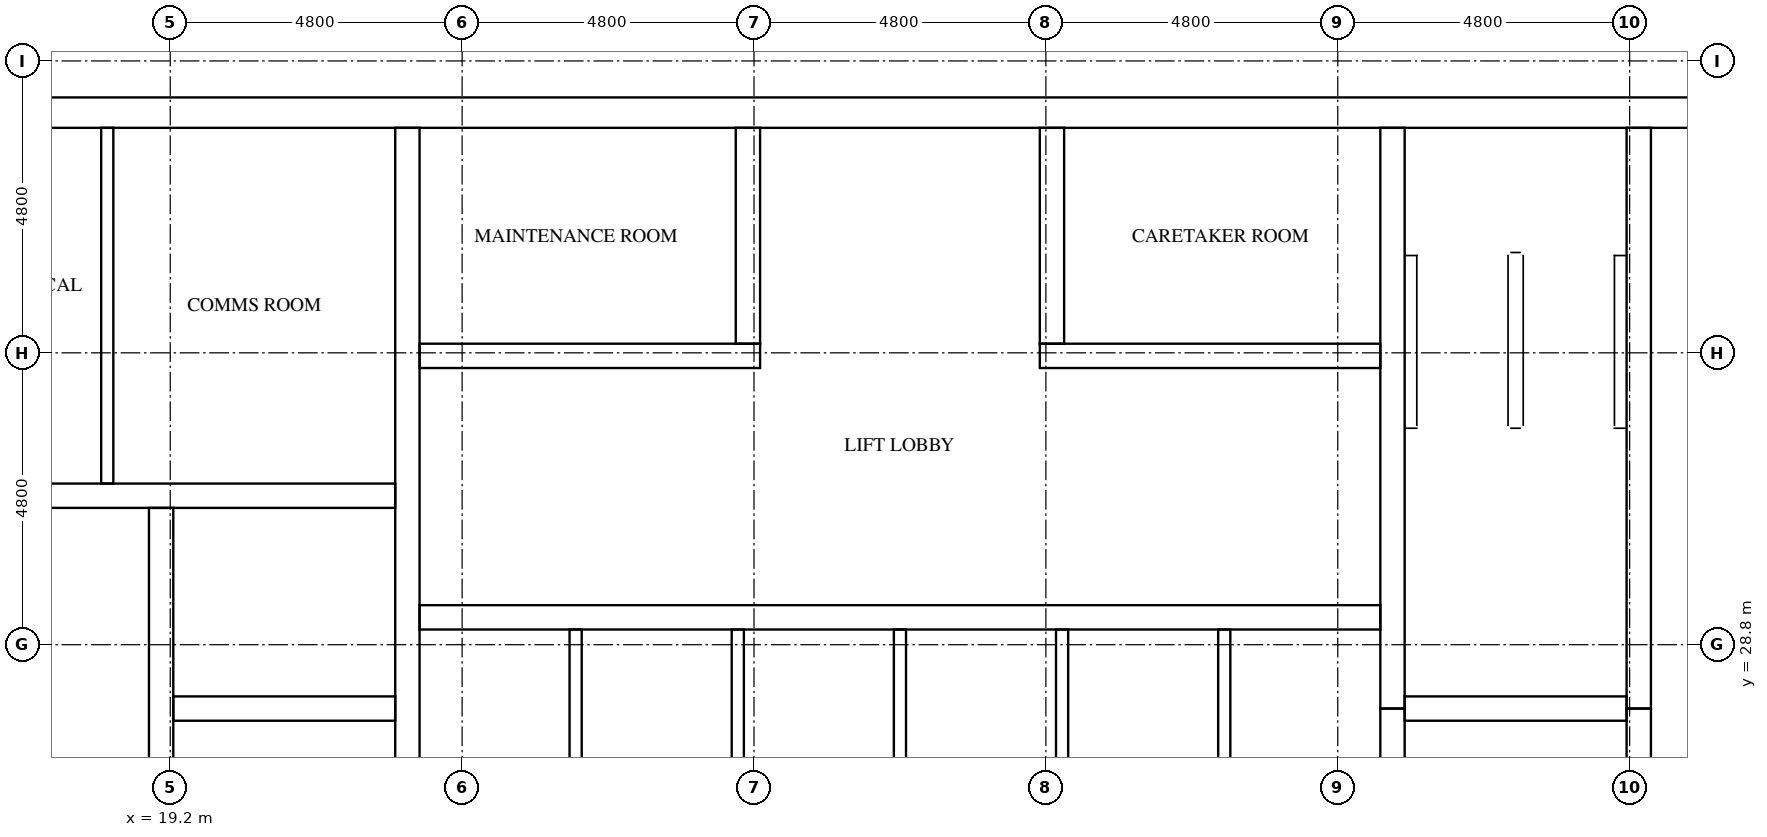
"""IFC4 building model, lengths in metres.
Left out: names, types, materials, properties, quantities, classifications, styles, units other than length and angle.
Written with IfcOpenShell. Run it as: python <this file> out.ifc"""

import sys

from ifc_helpers import new_model, si_unit, direction, frame, frame_2d, origin, place, context, subcontext, project, spatial, rectangle, extrude, element, fill, save


model = new_model("IFC4")
c1 = context("Model", 3, precision=1e-05, world=origin(), true_north=direction((0.0, 1.0)))
c2 = subcontext(c1, "Body", "Model", "MODEL_VIEW")
j1 = project(units=[si_unit("LENGTHUNIT", "METRE"), si_unit("PLANEANGLEUNIT", "RADIAN")], contexts=[c1])
p1 = place(None, origin())
s1 = spatial("IfcSite", under=j1, at=p1, CompositionType="ELEMENT")
p2 = place(p1, origin())
s2 = spatial("IfcBuilding", under=s1, at=p2, CompositionType="ELEMENT")
p3 = place(p2, frame((0.0, 0.0, 275.6)))
s3 = spatial("IfcBuildingStorey", under=s2, at=p3, CompositionType="ELEMENT", Elevation=275.6)
p4 = place(p3, frame((15.0, 37.55, 0.0), z_axis=(0.0, 0.0, 1.0), x_axis=(1.0, 0.0, 0.0)))
e1 = element("IfcWall", 1, at=p4, inside=s3, PredefinedType="SHEAR", context=c2, shape_type="SweptSolid", body=[
    extrude(rectangle(XDim=32.4, YDim=0.5, at=frame_2d((16.2, 0.0))), origin(), (0.0, 0.0, 1.0), 3.2),
])
p5 = place(p4, frame((15.3, 0.0, 0.0)))
e2 = element("IfcOpeningElement", 2, at=p5, cuts=e1, PredefinedType="OPENING", context=c2, shape_type="SweptSolid", body=[
    extrude(rectangle(XDim=1.8, YDim=2.1, at=frame_2d((0.9, 1.05))), frame((0.0, 0.26, 0.0), z_axis=(0.0, -1.0, 0.0), x_axis=(1.0, 0.0, 0.0)), (0.0, 0.0, 1.0), 0.52),
])
p6 = place(p4, frame((1.282, 0.0, 0.0)))
e3 = element("IfcOpeningElement", 3, at=p6, cuts=e1, PredefinedType="OPENING", context=c2, shape_type="SweptSolid", body=[
    extrude(rectangle(XDim=1.0, YDim=2.1, at=frame_2d((0.5, 1.05))), frame((0.0, 0.26, 0.0), z_axis=(0.0, -1.0, 0.0), x_axis=(1.0, 0.0, 0.0)), (0.0, 0.0, 1.0), 0.52),
])
p7 = place(p4, frame((5.082, 0.0, 0.0)))
e4 = element("IfcOpeningElement", 4, at=p7, cuts=e1, PredefinedType="OPENING", context=c2, shape_type="SweptSolid", body=[
    extrude(rectangle(XDim=1.0, YDim=2.1, at=frame_2d((0.5, 1.05))), frame((0.0, 0.26, 0.0), z_axis=(0.0, -1.0, 0.0), x_axis=(1.0, 0.0, 0.0)), (0.0, 0.0, 1.0), 0.52),
])
p8 = place(p3, frame((19.05, 15.5, 0.0), z_axis=(0.0, 0.0, 1.0), x_axis=(0.0, 1.0, 0.0)))
e5 = element("IfcWall", 5, at=p8, inside=s3, PredefinedType="SHEAR", context=c2, shape_type="SweptSolid", body=[
    extrude(rectangle(XDim=15.55, YDim=0.4, at=frame_2d((7.775, 0.0))), origin(), (0.0, 0.0, 1.0), 3.2),
])
p9 = place(p8, frame((9.95, 0.0, 0.0)))
e6 = element("IfcOpeningElement", 6, at=p9, cuts=e5, PredefinedType="OPENING", context=c2, shape_type="SweptSolid", body=[
    extrude(rectangle(XDim=1.1, YDim=2.1, at=frame_2d((0.55, 1.05))), frame((0.0, 0.21, 0.0), z_axis=(0.0, -1.0, 0.0), x_axis=(1.0, 0.0, 0.0)), (0.0, 0.0, 1.0), 0.42),
])
p10 = place(p8, frame((13.45, 0.0, 0.0)))
e7 = element("IfcOpeningElement", 7, at=p10, cuts=e5, PredefinedType="OPENING", context=c2, shape_type="SweptSolid", body=[
    extrude(rectangle(XDim=1.1, YDim=2.1, at=frame_2d((0.55, 1.05))), frame((0.0, 0.21, 0.0), z_axis=(0.0, -1.0, 0.0), x_axis=(1.0, 0.0, 0.0)), (0.0, 0.0, 1.0), 0.42),
])
p11 = place(p8, frame((0.7, 0.0, 0.0)))
e8 = element("IfcOpeningElement", 8, at=p11, cuts=e5, PredefinedType="OPENING", context=c2, shape_type="SweptSolid", body=[
    extrude(rectangle(XDim=1.2, YDim=2.1, at=frame_2d((0.6, 1.05))), frame((0.0, 0.21, 0.0), z_axis=(0.0, -1.0, 0.0), x_axis=(1.0, 0.0, 0.0)), (0.0, 0.0, 1.0), 0.42),
])
p12 = place(p3, frame((23.1, 15.5, 0.0), z_axis=(0.0, 0.0, 1.0), x_axis=(0.0, 1.0, 0.0)))
e9 = element("IfcWall", 9, at=p12, inside=s3, PredefinedType="SHEAR", context=c2, shape_type="SweptSolid", body=[
    extrude(rectangle(XDim=21.8, YDim=0.4, at=frame_2d((10.9, 0.0))), origin(), (0.0, 0.0, 1.0), 3.2),
])
p13 = place(p3, frame((39.3, 24.25, 0.0), z_axis=(0.0, 0.0, 1.0), x_axis=(0.0, 1.0, 0.0)))
e10 = element("IfcWall", 10, at=p13, inside=s3, PredefinedType="SHEAR", context=c2, shape_type="SweptSolid", body=[
    extrude(rectangle(XDim=3.5, YDim=0.4, at=frame_2d((1.75, 0.0))), origin(), (0.0, 0.0, 1.0), 3.2),
])
p14 = place(p3, frame((39.3, 27.75, 0.0), z_axis=(0.0, 0.0, 1.0), x_axis=(0.0, 1.0, 0.0)))
e11 = element("IfcWall", 11, at=p14, inside=s3, PredefinedType="SHEAR", context=c2, shape_type="SweptSolid", body=[
    extrude(rectangle(XDim=9.55, YDim=0.4, at=frame_2d((4.775, 0.0))), origin(), (0.0, 0.0, 1.0), 3.2),
])
p15 = place(p3, frame((43.35, 24.25, 0.0), z_axis=(0.0, 0.0, 1.0), x_axis=(0.0, 1.0, 0.0)))
e12 = element("IfcWall", 12, at=p15, inside=s3, PredefinedType="SHEAR", context=c2, shape_type="SweptSolid", body=[
    extrude(rectangle(XDim=3.5, YDim=0.4, at=frame_2d((1.75, 0.0))), origin(), (0.0, 0.0, 1.0), 3.2),
])
p16 = place(p15, frame((1.2, 0.0, 0.0)))
e13 = element("IfcOpeningElement", 13, at=p16, cuts=e12, PredefinedType="OPENING", context=c2, shape_type="SweptSolid", body=[
    extrude(rectangle(XDim=1.1, YDim=2.1, at=frame_2d((0.55, 1.05))), frame((0.0, 0.21, 0.0), z_axis=(0.0, -1.0, 0.0), x_axis=(1.0, 0.0, 0.0)), (0.0, 0.0, 1.0), 0.42),
])
p17 = place(p3, frame((43.35, 27.75, 0.0), z_axis=(0.0, 0.0, 1.0), x_axis=(0.0, 1.0, 0.0)))
e14 = element("IfcWall", 14, at=p17, inside=s3, PredefinedType="SHEAR", context=c2, shape_type="SweptSolid", body=[
    extrude(rectangle(XDim=9.55, YDim=0.4, at=frame_2d((4.775, 0.0))), origin(), (0.0, 0.0, 1.0), 3.2),
])
p18 = place(p17, frame((7.65, 0.0, 0.0)))
e15 = element("IfcOpeningElement", 15, at=p18, cuts=e14, PredefinedType="OPENING", context=c2, shape_type="SweptSolid", body=[
    extrude(rectangle(XDim=1.2, YDim=2.1, at=frame_2d((0.6, 1.05))), frame((0.0, 0.21, 0.0), z_axis=(0.0, -1.0, 0.0), x_axis=(1.0, 0.0, 0.0)), (0.0, 0.0, 1.0), 0.42),
])
p19 = place(p3, frame((19.25, 27.75, 0.0), z_axis=(0.0, 0.0, 1.0), x_axis=(1.0, 0.0, 0.0)))
e16 = element("IfcWall", 16, at=p19, inside=s3, PredefinedType="SHEAR", context=c2, shape_type="SweptSolid", body=[
    extrude(rectangle(XDim=3.65, YDim=0.4, at=frame_2d((1.825, 0.0))), origin(), (0.0, 0.0, 1.0), 3.2),
])
p20 = place(p3, frame((15.5, 31.25, 0.0), z_axis=(0.0, 0.0, 1.0), x_axis=(1.0, 0.0, 0.0)))
e17 = element("IfcWall", 17, at=p20, inside=s3, PredefinedType="SHEAR", context=c2, shape_type="SweptSolid", body=[
    extrude(rectangle(XDim=7.4, YDim=0.4, at=frame_2d((3.7, 0.0))), origin(), (0.0, 0.0, 1.0), 3.2),
])
p21 = place(p3, frame((39.5, 27.75, 0.0), z_axis=(0.0, 0.0, 1.0), x_axis=(1.0, 0.0, 0.0)))
e18 = element("IfcWall", 18, at=p21, inside=s3, PredefinedType="SHEAR", context=c2, shape_type="SweptSolid", body=[
    extrude(rectangle(XDim=3.65, YDim=0.4, at=frame_2d((1.825, 0.0))), origin(), (0.0, 0.0, 1.0), 3.2),
])
p22 = place(p3, frame((23.3, 29.25, 0.0), z_axis=(0.0, 0.0, 1.0), x_axis=(1.0, 0.0, 0.0)))
e19 = element("IfcWall", 19, at=p22, inside=s3, PredefinedType="SHEAR", context=c2, shape_type="SweptSolid", body=[
    extrude(rectangle(XDim=15.8, YDim=0.4, at=frame_2d((7.9, 0.0))), origin(), (0.0, 0.0, 1.0), 3.2),
])
p23 = place(p22, frame((0.683, 0.0, 0.0)))
e20 = element("IfcOpeningElement", 20, at=p23, cuts=e19, PredefinedType="OPENING", context=c2, shape_type="SweptSolid", body=[
    extrude(rectangle(XDim=1.1, YDim=2.1, at=frame_2d((0.55, 1.05))), frame((0.0, 0.21, 0.0), z_axis=(0.0, -1.0, 0.0), x_axis=(1.0, 0.0, 0.0)), (0.0, 0.0, 1.0), 0.42),
])
p24 = place(p22, frame((3.35, 0.0, 0.0)))
e21 = element("IfcOpeningElement", 21, at=p24, cuts=e19, PredefinedType="OPENING", context=c2, shape_type="SweptSolid", body=[
    extrude(rectangle(XDim=1.1, YDim=2.1, at=frame_2d((0.55, 1.05))), frame((0.0, 0.21, 0.0), z_axis=(0.0, -1.0, 0.0), x_axis=(1.0, 0.0, 0.0)), (0.0, 0.0, 1.0), 0.42),
])
p25 = place(p22, frame((6.017, 0.0, 0.0)))
e22 = element("IfcOpeningElement", 22, at=p25, cuts=e19, PredefinedType="OPENING", context=c2, shape_type="SweptSolid", body=[
    extrude(rectangle(XDim=1.1, YDim=2.1, at=frame_2d((0.55, 1.05))), frame((0.0, 0.21, 0.0), z_axis=(0.0, -1.0, 0.0), x_axis=(1.0, 0.0, 0.0)), (0.0, 0.0, 1.0), 0.42),
])
p26 = place(p22, frame((8.683, 0.0, 0.0)))
e23 = element("IfcOpeningElement", 23, at=p26, cuts=e19, PredefinedType="OPENING", context=c2, shape_type="SweptSolid", body=[
    extrude(rectangle(XDim=1.1, YDim=2.1, at=frame_2d((0.55, 1.05))), frame((0.0, 0.21, 0.0), z_axis=(0.0, -1.0, 0.0), x_axis=(1.0, 0.0, 0.0)), (0.0, 0.0, 1.0), 0.42),
])
p27 = place(p22, frame((11.35, 0.0, 0.0)))
e24 = element("IfcOpeningElement", 24, at=p27, cuts=e19, PredefinedType="OPENING", context=c2, shape_type="SweptSolid", body=[
    extrude(rectangle(XDim=1.1, YDim=2.1, at=frame_2d((0.55, 1.05))), frame((0.0, 0.21, 0.0), z_axis=(0.0, -1.0, 0.0), x_axis=(1.0, 0.0, 0.0)), (0.0, 0.0, 1.0), 0.42),
])
p28 = place(p22, frame((14.017, 0.0, 0.0)))
e25 = element("IfcOpeningElement", 25, at=p28, cuts=e19, PredefinedType="OPENING", context=c2, shape_type="SweptSolid", body=[
    extrude(rectangle(XDim=1.1, YDim=2.1, at=frame_2d((0.55, 1.05))), frame((0.0, 0.21, 0.0), z_axis=(0.0, -1.0, 0.0), x_axis=(1.0, 0.0, 0.0)), (0.0, 0.0, 1.0), 0.42),
])
p29 = place(p3, frame((23.3, 33.55, 0.0), z_axis=(0.0, 0.0, 1.0), x_axis=(1.0, 0.0, 0.0)))
e26 = element("IfcWall", 26, at=p29, inside=s3, PredefinedType="SHEAR", context=c2, shape_type="SweptSolid", body=[
    extrude(rectangle(XDim=5.6, YDim=0.4, at=frame_2d((2.8, 0.0))), origin(), (0.0, 0.0, 1.0), 3.2),
])
p30 = place(p29, frame((2.1, 0.0, 0.0)))
e27 = element("IfcOpeningElement", 27, at=p30, cuts=e26, PredefinedType="OPENING", context=c2, shape_type="SweptSolid", body=[
    extrude(rectangle(XDim=1.0, YDim=2.1, at=frame_2d((0.5, 1.05))), frame((0.0, 0.21, 0.0), z_axis=(0.0, -1.0, 0.0), x_axis=(1.0, 0.0, 0.0)), (0.0, 0.0, 1.0), 0.42),
])
p31 = place(p3, frame((33.5, 33.55, 0.0), z_axis=(0.0, 0.0, 1.0), x_axis=(1.0, 0.0, 0.0)))
e28 = element("IfcWall", 28, at=p31, inside=s3, PredefinedType="SHEAR", context=c2, shape_type="SweptSolid", body=[
    extrude(rectangle(XDim=5.6, YDim=0.4, at=frame_2d((2.8, 0.0))), origin(), (0.0, 0.0, 1.0), 3.2),
])
p32 = place(p31, frame((2.5, 0.0, 0.0)))
e29 = element("IfcOpeningElement", 29, at=p32, cuts=e28, PredefinedType="OPENING", context=c2, shape_type="SweptSolid", body=[
    extrude(rectangle(XDim=1.0, YDim=2.1, at=frame_2d((0.5, 1.05))), frame((0.0, 0.21, 0.0), z_axis=(0.0, -1.0, 0.0), x_axis=(1.0, 0.0, 0.0)), (0.0, 0.0, 1.0), 0.42),
])
for number, where, z_axis, x_axis in (
    (30, (28.7, 33.75, 0.0), (0.0, 0.0, 1.0), (0.0, 1.0, 0.0)),
    (31, (33.7, 33.75, 0.0), (0.0, 0.0, 1.0), (0.0, 1.0, 0.0)),
):
    element("IfcWall", number, at=place(p3, frame(where, z_axis=z_axis, x_axis=x_axis)), inside=s3, PredefinedType="SHEAR", context=c2, shape_type="SweptSolid", body=[
        extrude(rectangle(XDim=3.55, YDim=0.4, at=frame_2d((1.775, 0.0))), origin(), (0.0, 0.0, 1.0), 3.2),
    ])
for number, where, z_axis, x_axis in (
    (32, (25.867, 26.35, 0.0), (0.0, 0.0, 1.0), (0.0, 1.0, 0.0)),
    (33, (28.533, 26.35, 0.0), (0.0, 0.0, 1.0), (0.0, 1.0, 0.0)),
    (34, (31.2, 26.35, 0.0), (0.0, 0.0, 1.0), (0.0, 1.0, 0.0)),
    (35, (33.867, 26.35, 0.0), (0.0, 0.0, 1.0), (0.0, 1.0, 0.0)),
    (36, (36.533, 26.35, 0.0), (0.0, 0.0, 1.0), (0.0, 1.0, 0.0)),
):
    element("IfcWall", number, at=place(p3, frame(where, z_axis=z_axis, x_axis=x_axis)), inside=s3, PredefinedType="SOLIDWALL", context=c2, shape_type="SweptSolid", body=[
        extrude(rectangle(XDim=2.7, YDim=0.2, at=frame_2d((1.35, 0.0))), origin(), (0.0, 0.0, 1.0), 3.2),
    ])
p33 = place(p3, frame((18.164, 31.45, 0.0), z_axis=(0.0, 0.0, 1.0), x_axis=(0.0, 1.0, 0.0)))
e37 = element("IfcWall", 37, at=p33, inside=s3, PredefinedType="PARTITIONING", context=c2, shape_type="SweptSolid", body=[
    extrude(rectangle(XDim=5.85, YDim=0.2, at=frame_2d((2.925, 0.0))), origin(), (0.0, 0.0, 1.0), 3.2),
])
p34 = place(p23, origin())
e38 = element("IfcDoor", 38, at=p34, inside=s3, OperationType="DOUBLE_DOOR_SLIDING", PredefinedType="DOOR", context=c2, shape_type="SweptSolid", body=[
    extrude(rectangle(XDim=1.1, YDim=2.1, at=frame_2d((0.55, 1.05))), frame((0.0, 0.025, 0.0), z_axis=(0.0, -1.0, 0.0), x_axis=(1.0, 0.0, 0.0)), (0.0, 0.0, 1.0), 0.05),
])
fill(e20, e38)
p35 = place(p24, origin())
e39 = element("IfcDoor", 39, at=p35, inside=s3, OperationType="DOUBLE_DOOR_SLIDING", PredefinedType="DOOR", context=c2, shape_type="SweptSolid", body=[
    extrude(rectangle(XDim=1.1, YDim=2.1, at=frame_2d((0.55, 1.05))), frame((0.0, 0.025, 0.0), z_axis=(0.0, -1.0, 0.0), x_axis=(1.0, 0.0, 0.0)), (0.0, 0.0, 1.0), 0.05),
])
fill(e21, e39)
p36 = place(p25, origin())
e40 = element("IfcDoor", 40, at=p36, inside=s3, OperationType="DOUBLE_DOOR_SLIDING", PredefinedType="DOOR", context=c2, shape_type="SweptSolid", body=[
    extrude(rectangle(XDim=1.1, YDim=2.1, at=frame_2d((0.55, 1.05))), frame((0.0, 0.025, 0.0), z_axis=(0.0, -1.0, 0.0), x_axis=(1.0, 0.0, 0.0)), (0.0, 0.0, 1.0), 0.05),
])
fill(e22, e40)
p37 = place(p26, origin())
e41 = element("IfcDoor", 41, at=p37, inside=s3, OperationType="DOUBLE_DOOR_SLIDING", PredefinedType="DOOR", context=c2, shape_type="SweptSolid", body=[
    extrude(rectangle(XDim=1.1, YDim=2.1, at=frame_2d((0.55, 1.05))), frame((0.0, 0.025, 0.0), z_axis=(0.0, -1.0, 0.0), x_axis=(1.0, 0.0, 0.0)), (0.0, 0.0, 1.0), 0.05),
])
fill(e23, e41)
p38 = place(p27, origin())
e42 = element("IfcDoor", 42, at=p38, inside=s3, OperationType="DOUBLE_DOOR_SLIDING", PredefinedType="DOOR", context=c2, shape_type="SweptSolid", body=[
    extrude(rectangle(XDim=1.1, YDim=2.1, at=frame_2d((0.55, 1.05))), frame((0.0, 0.025, 0.0), z_axis=(0.0, -1.0, 0.0), x_axis=(1.0, 0.0, 0.0)), (0.0, 0.0, 1.0), 0.05),
])
fill(e24, e42)
p39 = place(p28, origin())
e43 = element("IfcDoor", 43, at=p39, inside=s3, OperationType="DOUBLE_DOOR_SLIDING", PredefinedType="DOOR", context=c2, shape_type="SweptSolid", body=[
    extrude(rectangle(XDim=1.1, YDim=2.1, at=frame_2d((0.55, 1.05))), frame((0.0, 0.025, 0.0), z_axis=(0.0, -1.0, 0.0), x_axis=(1.0, 0.0, 0.0)), (0.0, 0.0, 1.0), 0.05),
])
fill(e25, e43)
p40 = place(p10, origin())
e44 = element("IfcDoor", 44, at=p40, inside=s3, OperationType="DOUBLE_DOOR_SLIDING", PredefinedType="DOOR", context=c2, shape_type="SweptSolid", body=[
    extrude(rectangle(XDim=1.1, YDim=2.1, at=frame_2d((0.55, 1.05))), frame((0.0, 0.025, 0.0), z_axis=(0.0, -1.0, 0.0), x_axis=(1.0, 0.0, 0.0)), (0.0, 0.0, 1.0), 0.05),
])
fill(e7, e44)
p41 = place(p18, origin())
e45 = element("IfcDoor", 45, at=p41, inside=s3, OperationType="SINGLE_SWING_RIGHT", PredefinedType="DOOR", context=c2, shape_type="SweptSolid", body=[
    extrude(rectangle(XDim=1.2, YDim=2.1, at=frame_2d((0.6, 1.05))), frame((0.0, 0.025, 0.0), z_axis=(0.0, -1.0, 0.0), x_axis=(1.0, 0.0, 0.0)), (0.0, 0.0, 1.0), 0.05),
])
fill(e15, e45)
p42 = place(p5, origin())
e46 = element("IfcDoor", 46, at=p42, inside=s3, OperationType="DOUBLE_DOOR_SINGLE_SWING", PredefinedType="DOOR", context=c2, shape_type="SweptSolid", body=[
    extrude(rectangle(XDim=1.8, YDim=2.1, at=frame_2d((0.9, 1.05))), frame((0.0, 0.025, 0.0), z_axis=(0.0, -1.0, 0.0), x_axis=(1.0, 0.0, 0.0)), (0.0, 0.0, 1.0), 0.05),
])
fill(e2, e46)
p43 = place(p6, origin())
e47 = element("IfcDoor", 47, at=p43, inside=s3, OperationType="SINGLE_SWING_LEFT", PredefinedType="DOOR", context=c2, shape_type="SweptSolid", body=[
    extrude(rectangle(XDim=1.0, YDim=2.1, at=frame_2d((0.5, 1.05))), frame((0.0, 0.025, 0.0), z_axis=(0.0, -1.0, 0.0), x_axis=(1.0, 0.0, 0.0)), (0.0, 0.0, 1.0), 0.05),
])
fill(e3, e47)
p44 = place(p7, origin())
e48 = element("IfcDoor", 48, at=p44, inside=s3, OperationType="SINGLE_SWING_RIGHT", PredefinedType="DOOR", context=c2, shape_type="SweptSolid", body=[
    extrude(rectangle(XDim=1.0, YDim=2.1, at=frame_2d((0.5, 1.05))), frame((0.0, 0.025, 0.0), z_axis=(0.0, -1.0, 0.0), x_axis=(1.0, 0.0, 0.0)), (0.0, 0.0, 1.0), 0.05),
])
fill(e4, e48)
p45 = place(p30, frame((1.0, 0.0, 0.0), z_axis=(0.0, 0.0, 1.0), x_axis=(-1.0, 0.0, 0.0)))
e49 = element("IfcDoor", 49, at=p45, inside=s3, OperationType="SINGLE_SWING_LEFT", PredefinedType="DOOR", context=c2, shape_type="SweptSolid", body=[
    extrude(rectangle(XDim=1.0, YDim=2.1, at=frame_2d((0.5, 1.05))), frame((0.0, 0.025, 0.0), z_axis=(0.0, -1.0, 0.0), x_axis=(1.0, 0.0, 0.0)), (0.0, 0.0, 1.0), 0.05),
])
fill(e27, e49)
p46 = place(p32, frame((1.0, 0.0, 0.0), z_axis=(0.0, 0.0, 1.0), x_axis=(-1.0, 0.0, 0.0)))
e50 = element("IfcDoor", 50, at=p46, inside=s3, OperationType="SINGLE_SWING_RIGHT", PredefinedType="DOOR", context=c2, shape_type="SweptSolid", body=[
    extrude(rectangle(XDim=1.0, YDim=2.1, at=frame_2d((0.5, 1.05))), frame((0.0, 0.025, 0.0), z_axis=(0.0, -1.0, 0.0), x_axis=(1.0, 0.0, 0.0)), (0.0, 0.0, 1.0), 0.05),
])
fill(e29, e50)
save(model, sys.argv[1])
